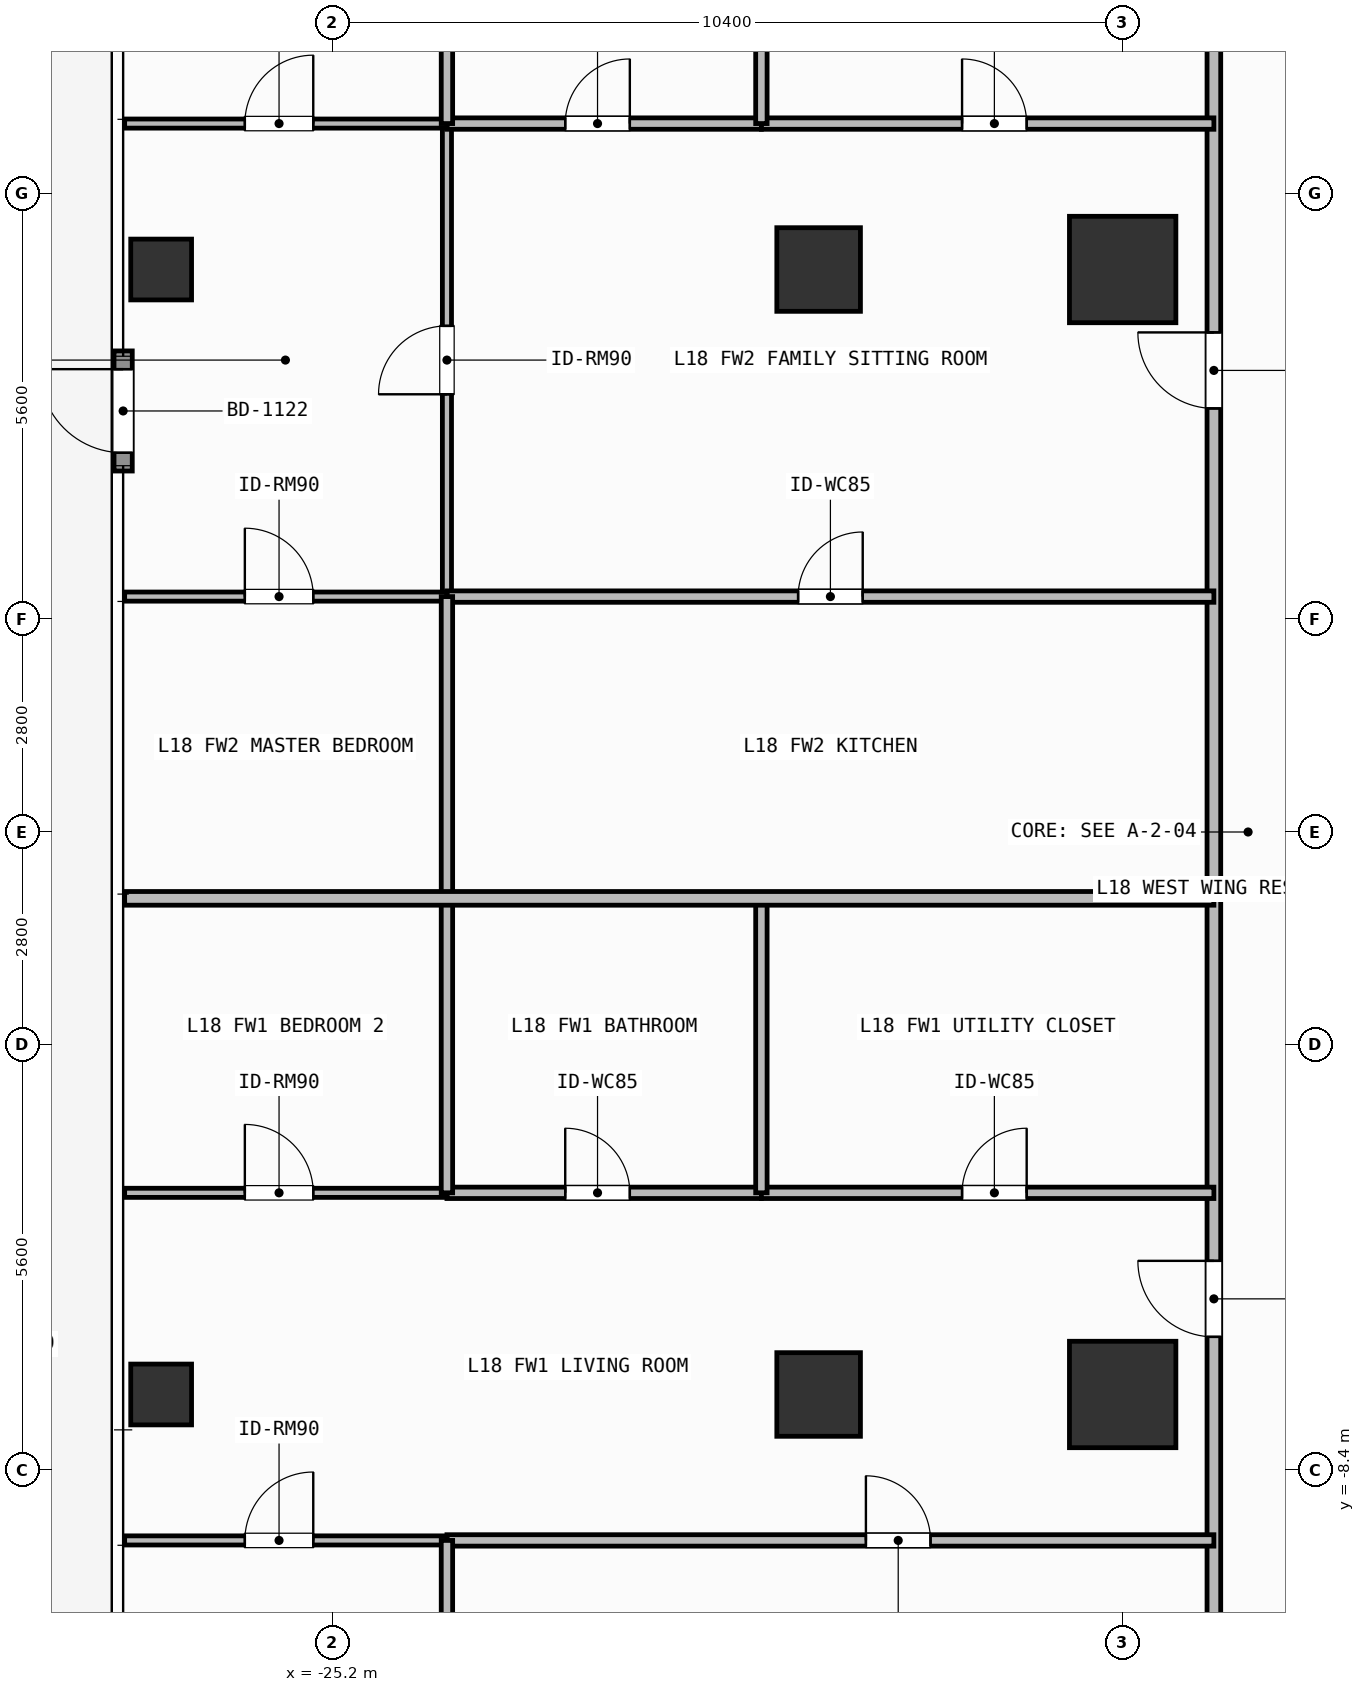
"""IFC4 building model, lengths in metres.
Left out: names, types, materials, properties, quantities, classifications, styles, units other than length and angle.
Written with IfcOpenShell. Run it as: python <this file> out.ifc"""

import sys

from ifc_helpers import new_model, si_unit, direction, frame, frame_2d, origin, origin_2d, place, context, subcontext, project, spatial, rectangle, hollow_rectangle, extrude, element, fill, save


model = new_model("IFC4")
c1 = context("Model", 3, precision=1e-05, world=origin(), true_north=direction((0.0, 1.0)))
c2 = subcontext(c1, "Body", "Model", "MODEL_VIEW")
j1 = project(units=[si_unit("LENGTHUNIT", "METRE"), si_unit("PLANEANGLEUNIT", "RADIAN")], contexts=[c1])
p1 = place(None, origin())
s1 = spatial("IfcSite", under=j1, at=p1, CompositionType="ELEMENT")
p2 = place(p1, origin())
s2 = spatial("IfcBuilding", under=s1, at=p2, CompositionType="ELEMENT")
p3 = place(p2, frame((0.0, 0.0, 69.6)))
s3 = spatial("IfcBuildingStorey", under=s2, at=p3, CompositionType="ELEMENT", Elevation=69.6)
for number, where, z_axis, x_axis in (
    (1, (-14.8, -7.4, 0.0), (0.0, 0.0, 1.0), (1.0, 0.0, 0.0)),
    (2, (-14.8, 7.4, 0.0), (0.0, 0.0, 1.0), (1.0, 0.0, 0.0)),
):
    element("IfcColumn", number, at=place(p3, frame(where, z_axis=z_axis, x_axis=x_axis)), inside=s3, PredefinedType="COLUMN", context=c2, shape_type="SweptSolid", body=[
        extrude(rectangle(XDim=1.4, YDim=1.4, at=origin_2d()), origin(), (0.0, 0.0, 1.0), 3.9),
    ])
for number, where, z_axis, x_axis in (
    (3, (-18.8, -7.4, 0.0), (0.0, 0.0, 1.0), (1.0, 0.0, 0.0)),
    (4, (-18.8, 7.4, 0.0), (0.0, 0.0, 1.0), (1.0, 0.0, 0.0)),
):
    element("IfcColumn", number, at=place(p3, frame(where, z_axis=z_axis, x_axis=x_axis)), inside=s3, PredefinedType="COLUMN", context=c2, shape_type="SweptSolid", body=[
        extrude(rectangle(XDim=1.1, YDim=1.1, at=origin_2d()), origin(), (0.0, 0.0, 1.0), 3.9),
    ])
for number, where, z_axis, x_axis in (
    (5, (-27.45, -7.4, 0.0), (0.0, 0.0, 1.0), (1.0, 0.0, 0.0)),
    (6, (-27.45, 7.4, 0.0), (0.0, 0.0, 1.0), (1.0, 0.0, 0.0)),
):
    element("IfcColumn", number, at=place(p3, frame(where, z_axis=z_axis, x_axis=x_axis)), inside=s3, PredefinedType="COLUMN", context=c2, shape_type="SweptSolid", body=[
        extrude(hollow_rectangle(XDim=0.8, YDim=0.8, WallThickness=0.036, at=origin_2d()), origin(), (0.0, 0.0, 1.0), 3.9),
    ])
p4 = place(p3, frame((-27.95, 4.749, 0.0), z_axis=(0.0, 0.0, 1.0), x_axis=(0.0, 1.0, 0.0)))
e7 = element("IfcWall", 7, at=p4, inside=s3, PredefinedType="SOLIDWALL", context=c2, shape_type="SweptSolid", body=[
    extrude(rectangle(XDim=1.58, YDim=0.24, at=frame_2d((0.79, 0.0))), origin(), (0.0, 0.0, 1.0), 3.68),
])
p5 = place(p4, frame((0.24, 0.0, 0.0)))
e8 = element("IfcOpeningElement", 8, at=p5, cuts=e7, PredefinedType="OPENING", context=c2, shape_type="SweptSolid", body=[
    extrude(rectangle(XDim=1.1, YDim=2.2, at=frame_2d((0.55, 1.1))), frame((0.0, 0.13, 0.0), z_axis=(0.0, -1.0, 0.0), x_axis=(1.0, 0.0, 0.0)), (0.0, 0.0, 1.0), 0.26),
])
p6 = place(p3, frame((-13.6, -12.12, 0.0), z_axis=(0.0, 0.0, 1.0), x_axis=(0.0, 1.0, 0.0)))
e9 = element("IfcWall", 9, at=p6, inside=s3, PredefinedType="PARTITIONING", context=c2, shape_type="SweptSolid", body=[
    extrude(rectangle(XDim=11.247, YDim=0.18, at=frame_2d((5.624, 0.0))), origin(), (0.0, 0.0, 1.0), 3.68),
])
p7 = place(p6, frame((5.478, 0.0, 0.0)))
e10 = element("IfcOpeningElement", 10, at=p7, cuts=e9, PredefinedType="OPENING", context=c2, shape_type="SweptSolid", body=[
    extrude(rectangle(XDim=1.0, YDim=2.2, at=frame_2d((0.5, 1.1))), frame((0.0, 0.1, 0.0), z_axis=(0.0, -1.0, 0.0), x_axis=(1.0, 0.0, 0.0)), (0.0, 0.0, 1.0), 0.2),
])
p8 = place(p3, frame((-23.69, -4.747, 0.0), z_axis=(0.0, 0.0, 1.0), x_axis=(1.0, 0.0, 0.0)))
e11 = element("IfcWall", 11, at=p8, inside=s3, PredefinedType="PARTITIONING", context=c2, shape_type="SweptSolid", body=[
    extrude(rectangle(XDim=4.137, YDim=0.15, at=frame_2d((2.068, 0.0))), origin(), (0.0, 0.0, 1.0), 3.68),
])
p9 = place(p8, frame((1.556, 0.0, 0.0)))
e12 = element("IfcOpeningElement", 12, at=p9, cuts=e11, PredefinedType="OPENING", context=c2, shape_type="SweptSolid", body=[
    extrude(rectangle(XDim=0.85, YDim=2.1, at=frame_2d((0.425, 1.05))), frame((0.0, 0.085, 0.0), z_axis=(0.0, -1.0, 0.0), x_axis=(1.0, 0.0, 0.0)), (0.0, 0.0, 1.0), 0.17),
])
p10 = place(p3, frame((-19.553, -4.747, 0.0), z_axis=(0.0, 0.0, 1.0), x_axis=(1.0, 0.0, 0.0)))
e13 = element("IfcWall", 13, at=p10, inside=s3, PredefinedType="PARTITIONING", context=c2, shape_type="SweptSolid", body=[
    extrude(rectangle(XDim=5.953, YDim=0.15, at=frame_2d((2.977, 0.0))), origin(), (0.0, 0.0, 1.0), 3.68),
])
p11 = place(p10, frame((2.64, 0.0, 0.0)))
e14 = element("IfcOpeningElement", 14, at=p11, cuts=e13, PredefinedType="OPENING", context=c2, shape_type="SweptSolid", body=[
    extrude(rectangle(XDim=0.85, YDim=2.1, at=frame_2d((0.425, 1.05))), frame((0.0, 0.085, 0.0), z_axis=(0.0, -1.0, 0.0), x_axis=(1.0, 0.0, 0.0)), (0.0, 0.0, 1.0), 0.17),
])
p12 = place(p3, frame((-23.69, -9.32, 0.0), z_axis=(0.0, 0.0, 1.0), x_axis=(1.0, 0.0, 0.0)))
e15 = element("IfcWall", 15, at=p12, inside=s3, PredefinedType="PARTITIONING", context=c2, shape_type="SweptSolid", body=[
    extrude(rectangle(XDim=10.09, YDim=0.15, at=frame_2d((5.045, 0.0))), origin(), (0.0, 0.0, 1.0), 3.68),
])
p13 = place(p12, frame((5.512, 0.0, 0.0)))
e16 = element("IfcOpeningElement", 16, at=p13, cuts=e15, PredefinedType="OPENING", context=c2, shape_type="SweptSolid", body=[
    extrude(rectangle(XDim=0.85, YDim=2.1, at=frame_2d((0.425, 1.05))), frame((0.0, 0.085, 0.0), z_axis=(0.0, -1.0, 0.0), x_axis=(1.0, 0.0, 0.0)), (0.0, 0.0, 1.0), 0.17),
])
p14 = place(p3, frame((-27.93, -9.32, 0.0), z_axis=(0.0, 0.0, 1.0), x_axis=(1.0, 0.0, 0.0)))
e17 = element("IfcWall", 17, at=p14, inside=s3, PredefinedType="PARTITIONING", context=c2, shape_type="SweptSolid", body=[
    extrude(rectangle(XDim=4.24, YDim=0.12, at=frame_2d((2.12, 0.0))), origin(), (0.0, 0.0, 1.0), 3.68),
])
p15 = place(p14, frame((1.581, 0.0, 0.0)))
e18 = element("IfcOpeningElement", 18, at=p15, cuts=e17, PredefinedType="OPENING", context=c2, shape_type="SweptSolid", body=[
    extrude(rectangle(XDim=0.9, YDim=2.1, at=frame_2d((0.45, 1.05))), frame((0.0, 0.07, 0.0), z_axis=(0.0, -1.0, 0.0), x_axis=(1.0, 0.0, 0.0)), (0.0, 0.0, 1.0), 0.14),
])
p16 = place(p3, frame((-27.93, -4.747, 0.0), z_axis=(0.0, 0.0, 1.0), x_axis=(1.0, 0.0, 0.0)))
e19 = element("IfcWall", 19, at=p16, inside=s3, PredefinedType="PARTITIONING", context=c2, shape_type="SweptSolid", body=[
    extrude(rectangle(XDim=4.24, YDim=0.12, at=frame_2d((2.12, 0.0))), origin(), (0.0, 0.0, 1.0), 3.68),
])
p17 = place(p16, frame((1.581, 0.0, 0.0)))
e20 = element("IfcOpeningElement", 20, at=p17, cuts=e19, PredefinedType="OPENING", context=c2, shape_type="SweptSolid", body=[
    extrude(rectangle(XDim=0.9, YDim=2.1, at=frame_2d((0.45, 1.05))), frame((0.0, 0.07, 0.0), z_axis=(0.0, -1.0, 0.0), x_axis=(1.0, 0.0, 0.0)), (0.0, 0.0, 1.0), 0.14),
])
p18 = place(p3, frame((-13.6, -0.873, 0.0), z_axis=(0.0, 0.0, 1.0), x_axis=(0.0, 1.0, 0.0)))
e21 = element("IfcWall", 21, at=p18, inside=s3, PredefinedType="PARTITIONING", context=c2, shape_type="SweptSolid", body=[
    extrude(rectangle(XDim=12.993, YDim=0.18, at=frame_2d((6.497, 0.0))), origin(), (0.0, 0.0, 1.0), 3.68),
])
p19 = place(p18, frame((6.446, 0.0, 0.0)))
e22 = element("IfcOpeningElement", 22, at=p19, cuts=e21, PredefinedType="OPENING", context=c2, shape_type="SweptSolid", body=[
    extrude(rectangle(XDim=1.0, YDim=2.2, at=frame_2d((0.5, 1.1))), frame((0.0, 0.1, 0.0), z_axis=(0.0, -1.0, 0.0), x_axis=(1.0, 0.0, 0.0)), (0.0, 0.0, 1.0), 0.2),
])
p20 = place(p3, frame((-23.69, 3.097, 0.0), z_axis=(0.0, 0.0, 1.0), x_axis=(0.0, 1.0, 0.0)))
e23 = element("IfcWall", 23, at=p20, inside=s3, PredefinedType="PARTITIONING", context=c2, shape_type="SweptSolid", body=[
    extrude(rectangle(XDim=6.223, YDim=0.12, at=frame_2d((3.112, 0.0))), origin(), (0.0, 0.0, 1.0), 3.68),
])
p21 = place(p20, frame((2.662, 0.0, 0.0)))
e24 = element("IfcOpeningElement", 24, at=p21, cuts=e23, PredefinedType="OPENING", context=c2, shape_type="SweptSolid", body=[
    extrude(rectangle(XDim=0.9, YDim=2.1, at=frame_2d((0.45, 1.05))), frame((0.0, 0.07, 0.0), z_axis=(0.0, -1.0, 0.0), x_axis=(1.0, 0.0, 0.0)), (0.0, 0.0, 1.0), 0.14),
])
p22 = place(p3, frame((-23.69, 9.32, 0.0), z_axis=(0.0, 0.0, 1.0), x_axis=(1.0, 0.0, 0.0)))
e25 = element("IfcWall", 25, at=p22, inside=s3, PredefinedType="PARTITIONING", context=c2, shape_type="SweptSolid", body=[
    extrude(rectangle(XDim=4.137, YDim=0.15, at=frame_2d((2.068, 0.0))), origin(), (0.0, 0.0, 1.0), 3.68),
])
p23 = place(p22, frame((1.556, 0.0, 0.0)))
e26 = element("IfcOpeningElement", 26, at=p23, cuts=e25, PredefinedType="OPENING", context=c2, shape_type="SweptSolid", body=[
    extrude(rectangle(XDim=0.85, YDim=2.1, at=frame_2d((0.425, 1.05))), frame((0.0, 0.085, 0.0), z_axis=(0.0, -1.0, 0.0), x_axis=(1.0, 0.0, 0.0)), (0.0, 0.0, 1.0), 0.17),
])
p24 = place(p3, frame((-19.553, 9.32, 0.0), z_axis=(0.0, 0.0, 1.0), x_axis=(1.0, 0.0, 0.0)))
e27 = element("IfcWall", 27, at=p24, inside=s3, PredefinedType="PARTITIONING", context=c2, shape_type="SweptSolid", body=[
    extrude(rectangle(XDim=5.953, YDim=0.15, at=frame_2d((2.977, 0.0))), origin(), (0.0, 0.0, 1.0), 3.68),
])
p25 = place(p24, frame((2.64, 0.0, 0.0)))
e28 = element("IfcOpeningElement", 28, at=p25, cuts=e27, PredefinedType="OPENING", context=c2, shape_type="SweptSolid", body=[
    extrude(rectangle(XDim=0.85, YDim=2.1, at=frame_2d((0.425, 1.05))), frame((0.0, 0.085, 0.0), z_axis=(0.0, -1.0, 0.0), x_axis=(1.0, 0.0, 0.0)), (0.0, 0.0, 1.0), 0.17),
])
p26 = place(p3, frame((-23.69, 3.097, 0.0), z_axis=(0.0, 0.0, 1.0), x_axis=(1.0, 0.0, 0.0)))
e29 = element("IfcWall", 29, at=p26, inside=s3, PredefinedType="PARTITIONING", context=c2, shape_type="SweptSolid", body=[
    extrude(rectangle(XDim=10.09, YDim=0.15, at=frame_2d((5.045, 0.0))), origin(), (0.0, 0.0, 1.0), 3.68),
])
p27 = place(p26, frame((4.62, 0.0, 0.0)))
e30 = element("IfcOpeningElement", 30, at=p27, cuts=e29, PredefinedType="OPENING", context=c2, shape_type="SweptSolid", body=[
    extrude(rectangle(XDim=0.85, YDim=2.1, at=frame_2d((0.425, 1.05))), frame((0.0, 0.085, 0.0), z_axis=(0.0, -1.0, 0.0), x_axis=(1.0, 0.0, 0.0)), (0.0, 0.0, 1.0), 0.17),
])
p28 = place(p3, frame((-27.93, 3.097, 0.0), z_axis=(0.0, 0.0, 1.0), x_axis=(1.0, 0.0, 0.0)))
e31 = element("IfcWall", 31, at=p28, inside=s3, PredefinedType="PARTITIONING", context=c2, shape_type="SweptSolid", body=[
    extrude(rectangle(XDim=4.24, YDim=0.12, at=frame_2d((2.12, 0.0))), origin(), (0.0, 0.0, 1.0), 3.68),
])
p29 = place(p28, frame((1.581, 0.0, 0.0)))
e32 = element("IfcOpeningElement", 32, at=p29, cuts=e31, PredefinedType="OPENING", context=c2, shape_type="SweptSolid", body=[
    extrude(rectangle(XDim=0.9, YDim=2.1, at=frame_2d((0.45, 1.05))), frame((0.0, 0.07, 0.0), z_axis=(0.0, -1.0, 0.0), x_axis=(1.0, 0.0, 0.0)), (0.0, 0.0, 1.0), 0.14),
])
p30 = place(p3, frame((-27.93, 9.32, 0.0), z_axis=(0.0, 0.0, 1.0), x_axis=(1.0, 0.0, 0.0)))
e33 = element("IfcWall", 33, at=p30, inside=s3, PredefinedType="PARTITIONING", context=c2, shape_type="SweptSolid", body=[
    extrude(rectangle(XDim=4.24, YDim=0.12, at=frame_2d((2.12, 0.0))), origin(), (0.0, 0.0, 1.0), 3.68),
])
p31 = place(p30, frame((1.581, 0.0, 0.0)))
e34 = element("IfcOpeningElement", 34, at=p31, cuts=e33, PredefinedType="OPENING", context=c2, shape_type="SweptSolid", body=[
    extrude(rectangle(XDim=0.9, YDim=2.1, at=frame_2d((0.45, 1.05))), frame((0.0, 0.07, 0.0), z_axis=(0.0, -1.0, 0.0), x_axis=(1.0, 0.0, 0.0)), (0.0, 0.0, 1.0), 0.14),
])
p32 = place(p3, frame((-19.553, -4.747, 0.0), z_axis=(0.0, 0.0, 1.0), x_axis=(0.0, 1.0, 0.0)))
e35 = element("IfcWall", 35, at=p32, inside=s3, PredefinedType="PARTITIONING", context=c2, shape_type="SweptSolid", body=[
    extrude(rectangle(XDim=3.874, YDim=0.15, at=frame_2d((1.937, 0.0))), origin(), (0.0, 0.0, 1.0), 3.68),
])
p33 = place(p3, frame((-23.69, -12.12, 0.0), z_axis=(0.0, 0.0, 1.0), x_axis=(0.0, 1.0, 0.0)))
e36 = element("IfcWall", 36, at=p33, inside=s3, PredefinedType="PARTITIONING", context=c2, shape_type="SweptSolid", body=[
    extrude(rectangle(XDim=2.8, YDim=0.15, at=frame_2d((1.4, 0.0))), origin(), (0.0, 0.0, 1.0), 3.68),
])
p34 = place(p3, frame((-23.69, -4.747, 0.0), z_axis=(0.0, 0.0, 1.0), x_axis=(0.0, 1.0, 0.0)))
e37 = element("IfcWall", 37, at=p34, inside=s3, PredefinedType="PARTITIONING", context=c2, shape_type="SweptSolid", body=[
    extrude(rectangle(XDim=3.874, YDim=0.15, at=frame_2d((1.937, 0.0))), origin(), (0.0, 0.0, 1.0), 3.68),
])
p35 = place(p3, frame((-19.553, 9.32, 0.0), z_axis=(0.0, 0.0, 1.0), x_axis=(0.0, 1.0, 0.0)))
e38 = element("IfcWall", 38, at=p35, inside=s3, PredefinedType="PARTITIONING", context=c2, shape_type="SweptSolid", body=[
    extrude(rectangle(XDim=2.8, YDim=0.15, at=frame_2d((1.4, 0.0))), origin(), (0.0, 0.0, 1.0), 3.68),
])
p36 = place(p3, frame((-23.69, -0.873, 0.0), z_axis=(0.0, 0.0, 1.0), x_axis=(0.0, 1.0, 0.0)))
e39 = element("IfcWall", 39, at=p36, inside=s3, PredefinedType="PARTITIONING", context=c2, shape_type="SweptSolid", body=[
    extrude(rectangle(XDim=3.97, YDim=0.15, at=frame_2d((1.985, 0.0))), origin(), (0.0, 0.0, 1.0), 3.68),
])
p37 = place(p3, frame((-23.69, 9.32, 0.0), z_axis=(0.0, 0.0, 1.0), x_axis=(0.0, 1.0, 0.0)))
e40 = element("IfcWall", 40, at=p37, inside=s3, PredefinedType="PARTITIONING", context=c2, shape_type="SweptSolid", body=[
    extrude(rectangle(XDim=2.8, YDim=0.15, at=frame_2d((1.4, 0.0))), origin(), (0.0, 0.0, 1.0), 3.68),
])
p38 = place(p3, frame((-27.93, -0.873, 0.0), z_axis=(0.0, 0.0, 1.0), x_axis=(1.0, 0.0, 0.0)))
e41 = element("IfcWall", 41, at=p38, inside=s3, PredefinedType="PARTITIONING", context=c2, shape_type="SweptSolid", body=[
    extrude(rectangle(XDim=14.33, YDim=0.18, at=frame_2d((7.165, 0.0))), origin(), (0.0, 0.0, 1.0), 3.68),
])
p39 = place(p5, origin())
e42 = element("IfcDoor", 42, at=p39, inside=s3, OperationType="SINGLE_SWING_RIGHT", PredefinedType="DOOR", context=c2, shape_type="SweptSolid", body=[
    extrude(rectangle(XDim=1.1, YDim=2.2, at=frame_2d((0.55, 1.1))), frame((0.0, 0.025, 0.0), z_axis=(0.0, -1.0, 0.0), x_axis=(1.0, 0.0, 0.0)), (0.0, 0.0, 1.0), 0.05),
])
fill(e8, e42)
p40 = place(p7, origin())
e43 = element("IfcDoor", 43, at=p40, inside=s3, OperationType="SINGLE_SWING_RIGHT", PredefinedType="DOOR", context=c2, shape_type="SweptSolid", body=[
    extrude(rectangle(XDim=1.0, YDim=2.2, at=frame_2d((0.5, 1.1))), frame((0.0, 0.025, 0.0), z_axis=(0.0, -1.0, 0.0), x_axis=(1.0, 0.0, 0.0)), (0.0, 0.0, 1.0), 0.05),
])
fill(e10, e43)
p41 = place(p9, origin())
e44 = element("IfcDoor", 44, at=p41, inside=s3, OperationType="SINGLE_SWING_LEFT", PredefinedType="DOOR", context=c2, shape_type="SweptSolid", body=[
    extrude(rectangle(XDim=0.85, YDim=2.1, at=frame_2d((0.425, 1.05))), frame((0.0, 0.025, 0.0), z_axis=(0.0, -1.0, 0.0), x_axis=(1.0, 0.0, 0.0)), (0.0, 0.0, 1.0), 0.05),
])
fill(e12, e44)
p42 = place(p11, origin())
e45 = element("IfcDoor", 45, at=p42, inside=s3, OperationType="SINGLE_SWING_RIGHT", PredefinedType="DOOR", context=c2, shape_type="SweptSolid", body=[
    extrude(rectangle(XDim=0.85, YDim=2.1, at=frame_2d((0.425, 1.05))), frame((0.0, 0.025, 0.0), z_axis=(0.0, -1.0, 0.0), x_axis=(1.0, 0.0, 0.0)), (0.0, 0.0, 1.0), 0.05),
])
fill(e14, e45)
p43 = place(p13, origin())
e46 = element("IfcDoor", 46, at=p43, inside=s3, OperationType="SINGLE_SWING_LEFT", PredefinedType="DOOR", context=c2, shape_type="SweptSolid", body=[
    extrude(rectangle(XDim=0.85, YDim=2.1, at=frame_2d((0.425, 1.05))), frame((0.0, 0.025, 0.0), z_axis=(0.0, -1.0, 0.0), x_axis=(1.0, 0.0, 0.0)), (0.0, 0.0, 1.0), 0.05),
])
fill(e16, e46)
p44 = place(p15, origin())
e47 = element("IfcDoor", 47, at=p44, inside=s3, OperationType="SINGLE_SWING_RIGHT", PredefinedType="DOOR", context=c2, shape_type="SweptSolid", body=[
    extrude(rectangle(XDim=0.9, YDim=2.1, at=frame_2d((0.45, 1.05))), frame((0.0, 0.025, 0.0), z_axis=(0.0, -1.0, 0.0), x_axis=(1.0, 0.0, 0.0)), (0.0, 0.0, 1.0), 0.05),
])
fill(e18, e47)
p45 = place(p17, origin())
e48 = element("IfcDoor", 48, at=p45, inside=s3, OperationType="SINGLE_SWING_LEFT", PredefinedType="DOOR", context=c2, shape_type="SweptSolid", body=[
    extrude(rectangle(XDim=0.9, YDim=2.1, at=frame_2d((0.45, 1.05))), frame((0.0, 0.025, 0.0), z_axis=(0.0, -1.0, 0.0), x_axis=(1.0, 0.0, 0.0)), (0.0, 0.0, 1.0), 0.05),
])
fill(e20, e48)
p46 = place(p19, origin())
e49 = element("IfcDoor", 49, at=p46, inside=s3, OperationType="SINGLE_SWING_RIGHT", PredefinedType="DOOR", context=c2, shape_type="SweptSolid", body=[
    extrude(rectangle(XDim=1.0, YDim=2.2, at=frame_2d((0.5, 1.1))), frame((0.0, 0.025, 0.0), z_axis=(0.0, -1.0, 0.0), x_axis=(1.0, 0.0, 0.0)), (0.0, 0.0, 1.0), 0.05),
])
fill(e22, e49)
p47 = place(p21, origin())
e50 = element("IfcDoor", 50, at=p47, inside=s3, OperationType="SINGLE_SWING_LEFT", PredefinedType="DOOR", context=c2, shape_type="SweptSolid", body=[
    extrude(rectangle(XDim=0.9, YDim=2.1, at=frame_2d((0.45, 1.05))), frame((0.0, 0.025, 0.0), z_axis=(0.0, -1.0, 0.0), x_axis=(1.0, 0.0, 0.0)), (0.0, 0.0, 1.0), 0.05),
])
fill(e24, e50)
p48 = place(p23, origin())
e51 = element("IfcDoor", 51, at=p48, inside=s3, OperationType="SINGLE_SWING_RIGHT", PredefinedType="DOOR", context=c2, shape_type="SweptSolid", body=[
    extrude(rectangle(XDim=0.85, YDim=2.1, at=frame_2d((0.425, 1.05))), frame((0.0, 0.025, 0.0), z_axis=(0.0, -1.0, 0.0), x_axis=(1.0, 0.0, 0.0)), (0.0, 0.0, 1.0), 0.05),
])
fill(e26, e51)
p49 = place(p25, origin())
e52 = element("IfcDoor", 52, at=p49, inside=s3, OperationType="SINGLE_SWING_LEFT", PredefinedType="DOOR", context=c2, shape_type="SweptSolid", body=[
    extrude(rectangle(XDim=0.85, YDim=2.1, at=frame_2d((0.425, 1.05))), frame((0.0, 0.025, 0.0), z_axis=(0.0, -1.0, 0.0), x_axis=(1.0, 0.0, 0.0)), (0.0, 0.0, 1.0), 0.05),
])
fill(e28, e52)
p50 = place(p27, origin())
e53 = element("IfcDoor", 53, at=p50, inside=s3, OperationType="SINGLE_SWING_RIGHT", PredefinedType="DOOR", context=c2, shape_type="SweptSolid", body=[
    extrude(rectangle(XDim=0.85, YDim=2.1, at=frame_2d((0.425, 1.05))), frame((0.0, 0.025, 0.0), z_axis=(0.0, -1.0, 0.0), x_axis=(1.0, 0.0, 0.0)), (0.0, 0.0, 1.0), 0.05),
])
fill(e30, e53)
p51 = place(p29, origin())
e54 = element("IfcDoor", 54, at=p51, inside=s3, OperationType="SINGLE_SWING_LEFT", PredefinedType="DOOR", context=c2, shape_type="SweptSolid", body=[
    extrude(rectangle(XDim=0.9, YDim=2.1, at=frame_2d((0.45, 1.05))), frame((0.0, 0.025, 0.0), z_axis=(0.0, -1.0, 0.0), x_axis=(1.0, 0.0, 0.0)), (0.0, 0.0, 1.0), 0.05),
])
fill(e32, e54)
p52 = place(p31, origin())
e55 = element("IfcDoor", 55, at=p52, inside=s3, OperationType="SINGLE_SWING_RIGHT", PredefinedType="DOOR", context=c2, shape_type="SweptSolid", body=[
    extrude(rectangle(XDim=0.9, YDim=2.1, at=frame_2d((0.45, 1.05))), frame((0.0, 0.025, 0.0), z_axis=(0.0, -1.0, 0.0), x_axis=(1.0, 0.0, 0.0)), (0.0, 0.0, 1.0), 0.05),
])
fill(e34, e55)
save(model, sys.argv[1])
